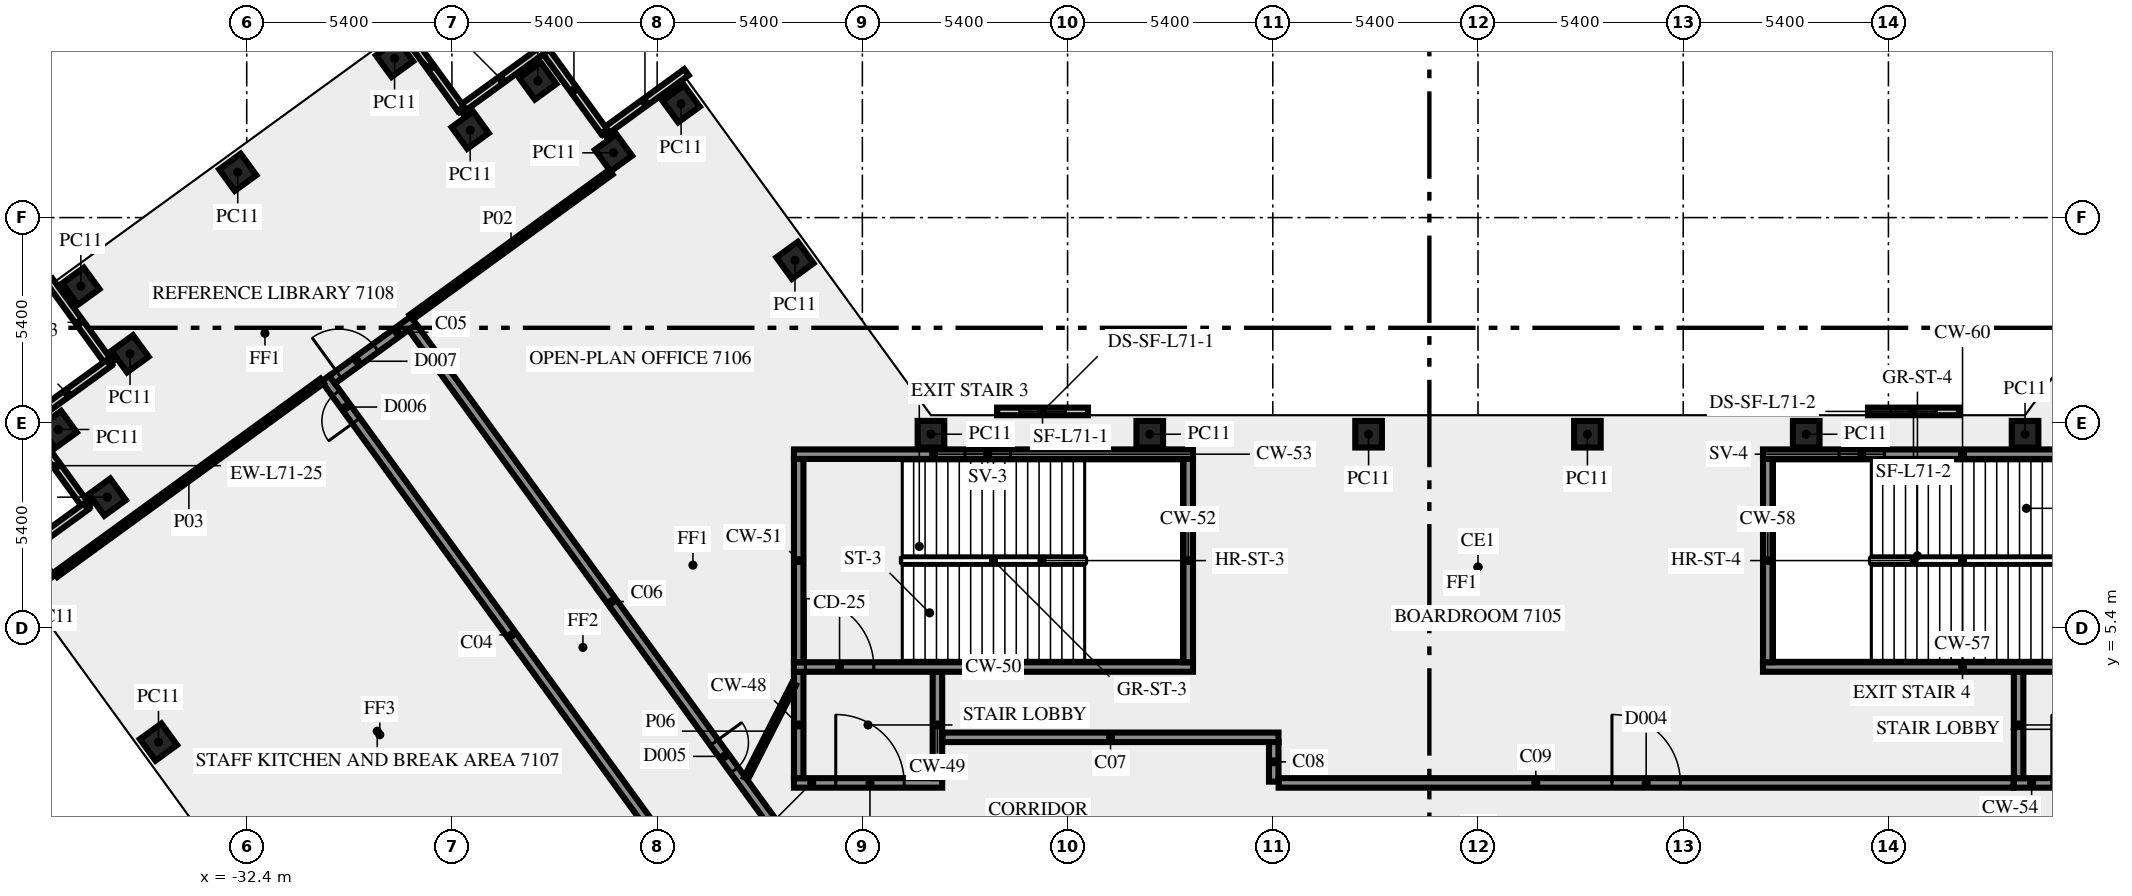
"""IFC4 building model, lengths in metres.
Left out: names, types, materials, properties, quantities, classifications, styles, units other than length and angle.
Written with IfcOpenShell. Run it as: python <this file> out.ifc"""

import sys

from ifc_helpers import new_model, si_unit, direction, frame, frame_2d, origin, origin_2d, place, context, subcontext, project, spatial, rectangle, extrude, element, fill, save


model = new_model("IFC4")
c1 = context("Model", 3, precision=1e-05, world=origin(), true_north=direction((0.0, 1.0)))
c2 = subcontext(c1, "Body", "Model", "MODEL_VIEW")
j1 = project(units=[si_unit("LENGTHUNIT", "METRE"), si_unit("PLANEANGLEUNIT", "RADIAN")], contexts=[c1])
p1 = place(None, origin())
s1 = spatial("IfcSite", under=j1, at=p1, CompositionType="ELEMENT")
p2 = place(p1, origin())
s2 = spatial("IfcBuilding", under=s1, at=p2, CompositionType="ELEMENT")
p3 = place(p2, frame((0.0, 0.0, 307.0)))
s3 = spatial("IfcBuildingStorey", under=s2, at=p3, CompositionType="ELEMENT", Elevation=307.0)
for number, where, z_axis, x_axis in (
    (1, (-17.974, 15.075, 0.0), (0.0, 0.0, 1.0), (-0.588, 0.809, 0.0)),
    (2, (-20.97, 19.195, 0.0), (0.0, 0.0, 1.0), (-0.588, 0.809, 0.0)),
    (3, (-22.749, 17.904, 0.0), (0.0, 0.0, 1.0), (-0.588, 0.809, 0.0)),
    (4, (-24.74, 19.795, 0.0), (0.0, 0.0, 1.0), (-0.588, 0.809, 0.0)),
    (5, (-26.519, 18.5, 0.0), (0.0, 0.0, 1.0), (-0.588, 0.809, 0.0)),
    (6, (-28.51, 20.39, 0.0), (0.0, 0.0, 1.0), (-0.809, -0.588, 0.0)),
    (7, (-32.637, 17.393, 0.0), (0.0, 0.0, 1.0), (-0.809, -0.588, 0.0)),
    (8, (-36.765, 14.395, 0.0), (0.0, 0.0, 1.0), (0.588, -0.809, 0.0)),
    (9, (-35.471, 12.616, 0.0), (0.0, 0.0, 1.0), (-0.809, -0.588, 0.0)),
    (10, (-37.36, 10.625, 0.0), (0.0, 0.0, 1.0), (0.588, -0.809, 0.0)),
    (11, (-36.068, 8.844, 0.0), (0.0, 0.0, 1.0), (0.588, -0.809, 0.0)),
    (12, (-37.96, 6.855, 0.0), (0.0, 0.0, 1.0), (0.588, -0.809, 0.0)),
    (13, (-34.722, 2.4, 0.0), (0.0, 0.0, 1.0), (0.588, -0.809, 0.0)),
    (14, (14.395, 10.5, 0.0), (0.0, 0.0, 1.0), (-1.0, 0.0, 0.0)),
    (15, (8.637, 10.5, 0.0), (0.0, 0.0, 1.0), (-1.0, 0.0, 0.0)),
    (16, (2.879, 10.5, 0.0), (0.0, 0.0, 1.0), (-1.0, 0.0, 0.0)),
    (17, (-2.879, 10.5, 0.0), (0.0, 0.0, 1.0), (-1.0, 0.0, 0.0)),
    (18, (-8.637, 10.5, 0.0), (0.0, 0.0, 1.0), (-1.0, 0.0, 0.0)),
    (19, (-14.395, 10.5, 0.0), (0.0, 0.0, 1.0), (-1.0, 0.0, 0.0)),
):
    element("IfcColumn", number, at=place(p3, frame(where, z_axis=z_axis, x_axis=x_axis)), inside=s3, PredefinedType="COLUMN", context=c2, shape_type="SweptSolid", body=[
        extrude(rectangle(XDim=0.7, YDim=0.7, at=origin_2d()), origin(), (0.0, 0.0, 1.0), 3.65),
    ])
p4 = place(p3, frame((12.655, 11.1, 0.0), z_axis=(0.0, 0.0, 1.0), x_axis=(-1.0, 0.0, 0.0)))
e20 = element("IfcWall", 20, at=p4, inside=s3, PredefinedType="SOLIDWALL", context=c2, shape_type="SweptSolid", body=[
    extrude(rectangle(XDim=2.392, YDim=0.2, at=frame_2d((1.196, 0.0))), origin(), (0.0, 0.0, 1.0), 3.65),
])
p5 = place(p4, frame((0.596, 0.0, 1.0)))
e21 = element("IfcOpeningElement", 21, at=p5, cuts=e20, PredefinedType="OPENING", context=c2, shape_type="SweptSolid", body=[
    extrude(rectangle(XDim=1.2, YDim=1.2, at=frame_2d((0.6, 0.6))), frame((0.0, 0.11, 0.0), z_axis=(0.0, -1.0, 0.0), x_axis=(1.0, 0.0, 0.0)), (0.0, 0.0, 1.0), 0.22),
])
p6 = place(p3, frame((-10.263, 11.1, 0.0), z_axis=(0.0, 0.0, 1.0), x_axis=(-1.0, 0.0, 0.0)))
e22 = element("IfcWall", 22, at=p6, inside=s3, PredefinedType="SOLIDWALL", context=c2, shape_type="SweptSolid", body=[
    extrude(rectangle(XDim=2.392, YDim=0.2, at=frame_2d((1.196, 0.0))), origin(), (0.0, 0.0, 1.0), 3.65),
])
p7 = place(p6, frame((0.596, 0.0, 1.0)))
e23 = element("IfcOpeningElement", 23, at=p7, cuts=e22, PredefinedType="OPENING", context=c2, shape_type="SweptSolid", body=[
    extrude(rectangle(XDim=1.2, YDim=1.2, at=frame_2d((0.6, 0.6))), frame((0.0, 0.11, 0.0), z_axis=(0.0, -1.0, 0.0), x_axis=(1.0, 0.0, 0.0)), (0.0, 0.0, 1.0), 0.22),
])
for number, where, z_axis, x_axis in (
    (24, (-20.829, 20.025, 0.0), (0.0, 0.0, 1.0), (-0.809, -0.588, 0.0)),
    (25, (-22.996, 18.466, 0.0), (0.0, 0.0, 1.0), (-0.588, 0.809, 0.0)),
):
    element("IfcWall", number, at=place(p3, frame(where, z_axis=z_axis, x_axis=x_axis)), inside=s3, PredefinedType="SOLIDWALL", context=c2, shape_type="SweptSolid", body=[
        extrude(rectangle(XDim=2.7, YDim=0.2, at=frame_2d((1.35, 0.0))), origin(), (0.0, 0.0, 1.0), 3.65),
    ])
for number, where, z_axis, x_axis in (
    (26, (-24.6, 20.623, 0.0), (0.0, 0.0, 1.0), (-0.809, -0.588, 0.0)),
    (27, (-26.768, 19.063, 0.0), (0.0, 0.0, 1.0), (-0.588, 0.809, 0.0)),
):
    element("IfcWall", number, at=place(p3, frame(where, z_axis=z_axis, x_axis=x_axis)), inside=s3, PredefinedType="SOLIDWALL", context=c2, shape_type="SweptSolid", body=[
        extrude(rectangle(XDim=2.7, YDim=0.2, at=frame_2d((1.35, 0.0))), origin(), (0.0, 0.0, 1.0), 3.65),
    ])
for number, where, z_axis, x_axis in (
    (28, (-37.592, 14.536, 0.0), (0.0, 0.0, 1.0), (0.588, -0.809, 0.0)),
    (29, (-36.032, 12.369, 0.0), (0.0, 0.0, 1.0), (-0.809, -0.588, 0.0)),
    (30, (-38.189, 10.765, 0.0), (0.0, 0.0, 1.0), (0.588, -0.809, 0.0)),
    (31, (-36.629, 8.597, 0.0), (0.0, 0.0, 1.0), (-0.809, -0.588, 0.0)),
):
    element("IfcWall", number, at=place(p3, frame(where, z_axis=z_axis, x_axis=x_axis)), inside=s3, PredefinedType="SOLIDWALL", context=c2, shape_type="SweptSolid", body=[
        extrude(rectangle(XDim=2.7, YDim=0.2, at=frame_2d((1.35, 0.0))), origin(), (0.0, 0.0, 1.0), 3.65),
    ])
p8 = place(p3, frame((-18.0, 1.325, 0.0), z_axis=(0.0, 0.0, 1.0), x_axis=(1.0, 0.0, 0.0)))
e32 = element("IfcWall", 32, at=p8, inside=s3, PredefinedType="SHEAR", context=c2, shape_type="SweptSolid", body=[
    extrude(rectangle(XDim=3.9, YDim=0.25, at=frame_2d((1.95, 0.0))), origin(), (0.0, 0.0, 1.0), 3.65),
])
p9 = place(p8, frame((1.1, 0.0, 0.0)))
e33 = element("IfcOpeningElement", 33, at=p9, cuts=e32, PredefinedType="OPENING", context=c2, shape_type="SweptSolid", body=[
    extrude(rectangle(XDim=1.8, YDim=2.1, at=frame_2d((0.9, 1.05))), frame((0.0, 0.135, 0.0), z_axis=(0.0, -1.0, 0.0), x_axis=(1.0, 0.0, 0.0)), (0.0, 0.0, 1.0), 0.27),
])
for number, where, z_axis, x_axis in (
    (34, (-17.875, 1.45, 0.0), (0.0, 0.0, 1.0), (0.0, 1.0, 0.0)),
    (35, (-14.225, 1.45, 0.0), (0.0, 0.0, 1.0), (0.0, 1.0, 0.0)),
):
    element("IfcWall", number, at=place(p3, frame(where, z_axis=z_axis, x_axis=x_axis)), inside=s3, PredefinedType="SHEAR", context=c2, shape_type="SweptSolid", body=[
        extrude(rectangle(XDim=2.8, YDim=0.25, at=frame_2d((1.4, 0.0))), origin(), (0.0, 0.0, 1.0), 3.65),
    ])
p10 = place(p3, frame((-18.0, 4.375, 0.0), z_axis=(0.0, 0.0, 1.0), x_axis=(1.0, 0.0, 0.0)))
e36 = element("IfcWall", 36, at=p10, inside=s3, PredefinedType="SHEAR", context=c2, shape_type="SweptSolid", body=[
    extrude(rectangle(XDim=10.5, YDim=0.25, at=frame_2d((5.25, 0.0))), origin(), (0.0, 0.0, 1.0), 3.65),
])
p11 = place(p10, frame((0.3, 0.0, 0.0)))
e37 = element("IfcOpeningElement", 37, at=p11, cuts=e36, PredefinedType="OPENING", context=c2, shape_type="SweptSolid", body=[
    extrude(rectangle(XDim=1.8, YDim=2.1, at=frame_2d((0.9, 1.05))), frame((0.0, 0.135, 0.0), z_axis=(0.0, -1.0, 0.0), x_axis=(1.0, 0.0, 0.0)), (0.0, 0.0, 1.0), 0.27),
])
for number, where, z_axis, x_axis in (
    (38, (-17.875, 4.5, 0.0), (0.0, 0.0, 1.0), (0.0, 1.0, 0.0)),
    (39, (-7.625, 4.5, 0.0), (0.0, 0.0, 1.0), (0.0, 1.0, 0.0)),
):
    element("IfcWall", number, at=place(p3, frame(where, z_axis=z_axis, x_axis=x_axis)), inside=s3, PredefinedType="SHEAR", context=c2, shape_type="SweptSolid", body=[
        extrude(rectangle(XDim=5.35, YDim=0.25, at=frame_2d((2.675, 0.0))), origin(), (0.0, 0.0, 1.0), 3.65),
    ])
p12 = place(p3, frame((-18.0, 9.975, 0.0), z_axis=(0.0, 0.0, 1.0), x_axis=(1.0, 0.0, 0.0)))
e40 = element("IfcWall", 40, at=p12, inside=s3, PredefinedType="SHEAR", context=c2, shape_type="SweptSolid", body=[
    extrude(rectangle(XDim=10.5, YDim=0.25, at=frame_2d((5.25, 0.0))), origin(), (0.0, 0.0, 1.0), 3.65),
])
p13 = place(p12, frame((4.5, 0.0, 1.0)))
e41 = element("IfcOpeningElement", 41, at=p13, cuts=e40, PredefinedType="OPENING", context=c2, shape_type="SweptSolid", body=[
    extrude(rectangle(XDim=1.2, YDim=1.2, at=frame_2d((0.6, 0.6))), frame((0.0, 0.135, 0.0), z_axis=(0.0, -1.0, 0.0), x_axis=(1.0, 0.0, 0.0)), (0.0, 0.0, 1.0), 0.27),
])
p14 = place(p3, frame((14.1, 1.325, 0.0), z_axis=(0.0, 0.0, 1.0), x_axis=(1.0, 0.0, 0.0)))
e42 = element("IfcWall", 42, at=p14, inside=s3, PredefinedType="SHEAR", context=c2, shape_type="SweptSolid", body=[
    extrude(rectangle(XDim=3.9, YDim=0.25, at=frame_2d((1.95, 0.0))), origin(), (0.0, 0.0, 1.0), 3.65),
])
p15 = place(p14, frame((1.0, 0.0, 0.0)))
e43 = element("IfcOpeningElement", 43, at=p15, cuts=e42, PredefinedType="OPENING", context=c2, shape_type="SweptSolid", body=[
    extrude(rectangle(XDim=1.8, YDim=2.1, at=frame_2d((0.9, 1.05))), frame((0.0, 0.135, 0.0), z_axis=(0.0, -1.0, 0.0), x_axis=(1.0, 0.0, 0.0)), (0.0, 0.0, 1.0), 0.27),
])
p16 = place(p3, frame((14.225, 1.45, 0.0), z_axis=(0.0, 0.0, 1.0), x_axis=(0.0, 1.0, 0.0)))
e44 = element("IfcWall", 44, at=p16, inside=s3, PredefinedType="SHEAR", context=c2, shape_type="SweptSolid", body=[
    extrude(rectangle(XDim=2.8, YDim=0.25, at=frame_2d((1.4, 0.0))), origin(), (0.0, 0.0, 1.0), 3.65),
])
p17 = place(p3, frame((7.5, 4.375, 0.0), z_axis=(0.0, 0.0, 1.0), x_axis=(1.0, 0.0, 0.0)))
e45 = element("IfcWall", 45, at=p17, inside=s3, PredefinedType="SHEAR", context=c2, shape_type="SweptSolid", body=[
    extrude(rectangle(XDim=10.5, YDim=0.25, at=frame_2d((5.25, 0.0))), origin(), (0.0, 0.0, 1.0), 3.65),
])
p18 = place(p17, frame((8.4, 0.0, 0.0)))
e46 = element("IfcOpeningElement", 46, at=p18, cuts=e45, PredefinedType="OPENING", context=c2, shape_type="SweptSolid", body=[
    extrude(rectangle(XDim=1.8, YDim=2.1, at=frame_2d((0.9, 1.05))), frame((0.0, 0.135, 0.0), z_axis=(0.0, -1.0, 0.0), x_axis=(1.0, 0.0, 0.0)), (0.0, 0.0, 1.0), 0.27),
])
p19 = place(p3, frame((7.625, 4.5, 0.0), z_axis=(0.0, 0.0, 1.0), x_axis=(0.0, 1.0, 0.0)))
e47 = element("IfcWall", 47, at=p19, inside=s3, PredefinedType="SHEAR", context=c2, shape_type="SweptSolid", body=[
    extrude(rectangle(XDim=5.35, YDim=0.25, at=frame_2d((2.675, 0.0))), origin(), (0.0, 0.0, 1.0), 3.65),
])
p20 = place(p3, frame((7.5, 9.975, 0.0), z_axis=(0.0, 0.0, 1.0), x_axis=(1.0, 0.0, 0.0)))
e48 = element("IfcWall", 48, at=p20, inside=s3, PredefinedType="SHEAR", context=c2, shape_type="SweptSolid", body=[
    extrude(rectangle(XDim=10.5, YDim=0.25, at=frame_2d((5.25, 0.0))), origin(), (0.0, 0.0, 1.0), 3.65),
])
p21 = place(p20, frame((2.0, 0.0, 1.0)))
e49 = element("IfcOpeningElement", 49, at=p21, cuts=e48, PredefinedType="OPENING", context=c2, shape_type="SweptSolid", body=[
    extrude(rectangle(XDim=1.2, YDim=1.2, at=frame_2d((0.6, 0.6))), frame((0.0, 0.135, 0.0), z_axis=(0.0, -1.0, 0.0), x_axis=(1.0, 0.0, 0.0)), (0.0, 0.0, 1.0), 0.27),
])
p22 = place(p3, frame((-20.531, -1.523, 0.0), z_axis=(0.0, 0.0, 1.0), x_axis=(-0.587785867777, 0.809016547199, 0.0)))
e50 = element("IfcWall", 50, at=p22, inside=s3, PredefinedType="SOLIDWALL", context=c2, shape_type="SweptSolid", body=[
    extrude(rectangle(XDim=16.67, YDim=0.25, at=frame_2d((8.335, 0.0))), origin(), (0.0, 0.0, 1.0), 3.65),
])
p23 = place(p22, frame((15.296, 0.0, 0.0)))
e51 = element("IfcOpeningElement", 51, at=p23, cuts=e50, PredefinedType="OPENING", context=c2, shape_type="SweptSolid", body=[
    extrude(rectangle(XDim=0.9, YDim=2.1, at=frame_2d((0.45, 1.05))), frame((0.0, 0.135, 0.0), z_axis=(0.0, -1.0, 0.0), x_axis=(1.0, 0.0, 0.0)), (0.0, 0.0, 1.0), 0.27),
])
p24 = place(p3, frame((-30.155, 11.936, 0.0), z_axis=(0.0, 0.0, 1.0), x_axis=(0.809038743598, 0.587755315891, 0.0)))
e52 = element("IfcWall", 52, at=p24, inside=s3, PredefinedType="SOLIDWALL", context=c2, shape_type="SweptSolid", body=[
    extrude(rectangle(XDim=2.65, YDim=0.25, at=frame_2d((1.325, 0.0))), origin(), (0.0, 0.0, 1.0), 3.65),
])
p25 = place(p24, frame((0.225, 0.0, 0.0)))
e53 = element("IfcOpeningElement", 53, at=p25, cuts=e52, PredefinedType="OPENING", context=c2, shape_type="SweptSolid", body=[
    extrude(rectangle(XDim=1.2, YDim=2.1, at=frame_2d((0.6, 1.05))), frame((0.0, 0.135, 0.0), z_axis=(0.0, -1.0, 0.0), x_axis=(1.0, 0.0, 0.0)), (0.0, 0.0, 1.0), 0.27),
])
p26 = place(p3, frame((-28.039, 13.319, 0.0), z_axis=(0.0, 0.0, 1.0), x_axis=(0.587791911753, -0.809012155952, 0.0)))
e54 = element("IfcWall", 54, at=p26, inside=s3, PredefinedType="SOLIDWALL", context=c2, shape_type="SweptSolid", body=[
    extrude(rectangle(XDim=17.853, YDim=0.25, at=frame_2d((8.927, 0.0))), origin(), (0.0, 0.0, 1.0), 3.65),
])
p27 = place(p26, frame((13.512, 0.0, 0.0)))
e55 = element("IfcOpeningElement", 55, at=p27, cuts=e54, PredefinedType="OPENING", context=c2, shape_type="SweptSolid", body=[
    extrude(rectangle(XDim=0.9, YDim=2.1, at=frame_2d((0.45, 1.05))), frame((0.0, 0.135, 0.0), z_axis=(0.0, -1.0, 0.0), x_axis=(1.0, 0.0, 0.0)), (0.0, 0.0, 1.0), 0.27),
])
p28 = place(p3, frame((-14.09, 2.525, 0.0), z_axis=(0.0, 0.0, 1.0), x_axis=(1.0, 0.0, 0.0)))
e56 = element("IfcWall", 56, at=p28, inside=s3, PredefinedType="SOLIDWALL", context=c2, shape_type="SweptSolid", body=[
    extrude(rectangle(XDim=8.84, YDim=0.25, at=frame_2d((4.42, 0.0))), origin(), (0.0, 0.0, 1.0), 3.65),
])
p29 = place(p3, frame((-5.375, 2.4, 0.0), z_axis=(0.0, 0.0, 1.0), x_axis=(0.0, -1.0, 0.0)))
e57 = element("IfcWall", 57, at=p29, inside=s3, PredefinedType="SOLIDWALL", context=c2, shape_type="SweptSolid", body=[
    extrude(rectangle(XDim=1.041, YDim=0.25, at=frame_2d((0.521, 0.0))), origin(), (0.0, 0.0, 1.0), 3.65),
])
p30 = place(p3, frame((-5.246, 1.325, 0.0), z_axis=(0.0, 0.0, 1.0), x_axis=(1.0, 0.0, 0.0)))
e58 = element("IfcWall", 58, at=p30, inside=s3, PredefinedType="SOLIDWALL", context=c2, shape_type="SweptSolid", body=[
    extrude(rectangle(XDim=19.336, YDim=0.25, at=frame_2d((9.668, 0.0))), origin(), (0.0, 0.0, 1.0), 3.65),
])
p31 = place(p30, frame((8.771, 0.0, 0.0)))
e59 = element("IfcOpeningElement", 59, at=p31, cuts=e58, PredefinedType="OPENING", context=c2, shape_type="SweptSolid", body=[
    extrude(rectangle(XDim=1.8, YDim=2.1, at=frame_2d((0.9, 1.05))), frame((0.0, 0.135, 0.0), z_axis=(0.0, -1.0, 0.0), x_axis=(1.0, 0.0, 0.0)), (0.0, 0.0, 1.0), 0.27),
])
p32 = place(p3, frame((-22.818, 17.396, 0.0), z_axis=(0.0, 0.0, 1.0), x_axis=(-0.809000932727, -0.587807358619, 0.0)))
e60 = element("IfcWall", 60, at=p32, inside=s3, PredefinedType="PARTITIONING", context=c2, shape_type="SweptSolid", body=[
    extrude(rectangle(XDim=6.496, YDim=0.15, at=frame_2d((3.248, 0.0))), origin(), (0.0, 0.0, 1.0), 3.65),
])
p33 = place(p3, frame((-37.429, 6.805, 0.0), z_axis=(0.0, 0.0, 1.0), x_axis=(0.809020922653, 0.587779845444, 0.0)))
e61 = element("IfcWall", 61, at=p33, inside=s3, PredefinedType="PARTITIONING", context=c2, shape_type="SweptSolid", body=[
    extrude(rectangle(XDim=8.67, YDim=0.15, at=frame_2d((4.335, 0.0))), origin(), (0.0, 0.0, 1.0), 3.65),
])
p34 = place(p3, frame((-19.261, 1.45, 0.0), z_axis=(0.0, 0.0, 1.0), x_axis=(0.453950796792, 0.891026752736, 0.0)))
e62 = element("IfcWall", 62, at=p34, inside=s3, PredefinedType="PARTITIONING", context=c2, shape_type="SweptSolid", body=[
    extrude(rectangle(XDim=2.778, YDim=0.12, at=frame_2d((1.389, 0.0))), origin(), (0.0, 0.0, 1.0), 3.65),
])
p35 = place(p5, origin())
e63 = element("IfcWindow", 63, at=p35, inside=s3, PartitioningType="SINGLE_PANEL", PredefinedType="WINDOW", context=c2, shape_type="SweptSolid", body=[
    extrude(rectangle(XDim=1.2, YDim=1.2, at=frame_2d((0.6, 0.6))), frame((0.0, 0.03, 0.0), z_axis=(0.0, -1.0, 0.0), x_axis=(1.0, 0.0, 0.0)), (0.0, 0.0, 1.0), 0.06),
])
fill(e21, e63)
p36 = place(p7, origin())
e64 = element("IfcWindow", 64, at=p36, inside=s3, PartitioningType="SINGLE_PANEL", PredefinedType="WINDOW", context=c2, shape_type="SweptSolid", body=[
    extrude(rectangle(XDim=1.2, YDim=1.2, at=frame_2d((0.6, 0.6))), frame((0.0, 0.03, 0.0), z_axis=(0.0, -1.0, 0.0), x_axis=(1.0, 0.0, 0.0)), (0.0, 0.0, 1.0), 0.06),
])
fill(e23, e64)
p37 = place(p9, origin())
e65 = element("IfcDoor", 65, at=p37, inside=s3, OperationType="DOUBLE_DOOR_SINGLE_SWING", PredefinedType="DOOR", context=c2, shape_type="SweptSolid", body=[
    extrude(rectangle(XDim=1.8, YDim=2.1, at=frame_2d((0.9, 1.05))), frame((0.0, 0.025, 0.0), z_axis=(0.0, -1.0, 0.0), x_axis=(1.0, 0.0, 0.0)), (0.0, 0.0, 1.0), 0.05),
])
fill(e33, e65)
p38 = place(p11, origin())
e66 = element("IfcDoor", 66, at=p38, inside=s3, OperationType="DOUBLE_DOOR_SINGLE_SWING", PredefinedType="DOOR", context=c2, shape_type="SweptSolid", body=[
    extrude(rectangle(XDim=1.8, YDim=2.1, at=frame_2d((0.9, 1.05))), frame((0.0, 0.025, 0.0), z_axis=(0.0, -1.0, 0.0), x_axis=(1.0, 0.0, 0.0)), (0.0, 0.0, 1.0), 0.05),
])
fill(e37, e66)
p39 = place(p13, origin())
e67 = element("IfcWindow", 67, at=p39, inside=s3, PartitioningType="SINGLE_PANEL", PredefinedType="WINDOW", context=c2, shape_type="SweptSolid", body=[
    extrude(rectangle(XDim=1.2, YDim=1.2, at=frame_2d((0.6, 0.6))), frame((0.0, 0.03, 0.0), z_axis=(0.0, -1.0, 0.0), x_axis=(1.0, 0.0, 0.0)), (0.0, 0.0, 1.0), 0.06),
])
fill(e41, e67)
p40 = place(p15, origin())
e68 = element("IfcDoor", 68, at=p40, inside=s3, OperationType="DOUBLE_DOOR_SINGLE_SWING", PredefinedType="DOOR", context=c2, shape_type="SweptSolid", body=[
    extrude(rectangle(XDim=1.8, YDim=2.1, at=frame_2d((0.9, 1.05))), frame((0.0, 0.025, 0.0), z_axis=(0.0, -1.0, 0.0), x_axis=(1.0, 0.0, 0.0)), (0.0, 0.0, 1.0), 0.05),
])
fill(e43, e68)
p41 = place(p21, origin())
e69 = element("IfcWindow", 69, at=p41, inside=s3, PartitioningType="SINGLE_PANEL", PredefinedType="WINDOW", context=c2, shape_type="SweptSolid", body=[
    extrude(rectangle(XDim=1.2, YDim=1.2, at=frame_2d((0.6, 0.6))), frame((0.0, 0.03, 0.0), z_axis=(0.0, -1.0, 0.0), x_axis=(1.0, 0.0, 0.0)), (0.0, 0.0, 1.0), 0.06),
])
fill(e49, e69)
p42 = place(p31, origin())
e70 = element("IfcDoor", 70, at=p42, inside=s3, OperationType="DOUBLE_DOOR_SINGLE_SWING", PredefinedType="DOOR", context=c2, shape_type="SweptSolid", body=[
    extrude(rectangle(XDim=1.8, YDim=2.1, at=frame_2d((0.9, 1.05))), frame((0.0, 0.025, 0.0), z_axis=(0.0, -1.0, 0.0), x_axis=(1.0, 0.0, 0.0)), (0.0, 0.0, 1.0), 0.05),
])
fill(e59, e70)
p43 = place(p27, origin())
e71 = element("IfcDoor", 71, at=p43, inside=s3, OperationType="SINGLE_SWING_RIGHT", PredefinedType="DOOR", context=c2, shape_type="SweptSolid", body=[
    extrude(rectangle(XDim=0.9, YDim=2.1, at=frame_2d((0.45, 1.05))), frame((0.0, 0.025, 0.0), z_axis=(0.0, -1.0, 0.0), x_axis=(1.0, 0.0, 0.0)), (0.0, 0.0, 1.0), 0.05),
])
fill(e55, e71)
p44 = place(p25, origin())
e72 = element("IfcDoor", 72, at=p44, inside=s3, OperationType="SINGLE_SWING_LEFT", PredefinedType="DOOR", context=c2, shape_type="SweptSolid", body=[
    extrude(rectangle(XDim=1.2, YDim=2.1, at=frame_2d((0.6, 1.05))), frame((0.0, 0.025, 0.0), z_axis=(0.0, -1.0, 0.0), x_axis=(1.0, 0.0, 0.0)), (0.0, 0.0, 1.0), 0.05),
])
fill(e53, e72)
p45 = place(p23, origin())
e73 = element("IfcDoor", 73, at=p45, inside=s3, OperationType="SINGLE_SWING_RIGHT", PredefinedType="DOOR", context=c2, shape_type="SweptSolid", body=[
    extrude(rectangle(XDim=0.9, YDim=2.1, at=frame_2d((0.45, 1.05))), frame((0.0, 0.025, 0.0), z_axis=(0.0, -1.0, 0.0), x_axis=(1.0, 0.0, 0.0)), (0.0, 0.0, 1.0), 0.05),
])
fill(e51, e73)
save(model, sys.argv[1])
